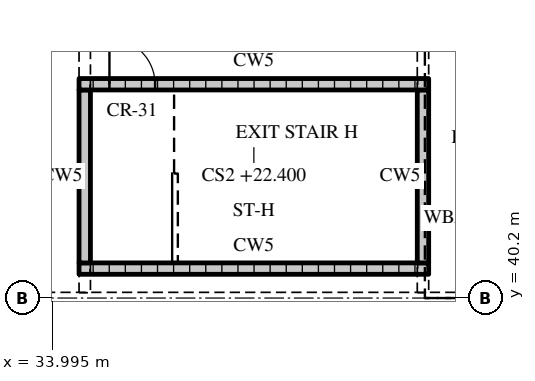
"""IFC4 building model, lengths in metres.
Left out: names, types, materials, properties, quantities, classifications, styles, units other than length and angle.
Written with IfcOpenShell. Run it as: python <this file> out.ifc"""

import sys

from ifc_helpers import new_model, si_unit, direction, frame, frame_2d, origin, place, context, subcontext, project, spatial, rectangle, extrude, element, fill, save


model = new_model("IFC4")
c1 = context("Model", 3, precision=1e-05, world=origin(), true_north=direction((0.0, 1.0)))
c2 = subcontext(c1, "Body", "Model", "MODEL_VIEW")
j1 = project(units=[si_unit("LENGTHUNIT", "METRE"), si_unit("PLANEANGLEUNIT", "RADIAN")], contexts=[c1])
p1 = place(None, origin())
s1 = spatial("IfcSite", under=j1, at=p1, CompositionType="ELEMENT")
p2 = place(p1, origin())
s2 = spatial("IfcBuilding", under=s1, at=p2, CompositionType="ELEMENT")
p3 = place(p2, frame((0.0, 0.0, 19.2)))
s3 = spatial("IfcBuildingStorey", under=s2, at=p3, CompositionType="ELEMENT", Elevation=19.2)
p4 = place(p3, frame((34.7, 40.975, 0.0), z_axis=(0.0, 0.0, 1.0), x_axis=(1.0, 0.0, 0.0)))
e1 = element("IfcWall", 1, at=p4, inside=s3, PredefinedType="SOLIDWALL", context=c2, shape_type="SweptSolid", body=[
    extrude(rectangle(XDim=9.2, YDim=0.3, at=frame_2d((4.6, 0.0))), origin(), (0.0, 0.0, 1.0), 3.0),
])
for number, where, z_axis, x_axis in (
    (2, (34.85, 41.125, 0.0), (0.0, 0.0, 1.0), (0.0, 1.0, 0.0)),
    (3, (43.75, 41.125, 0.0), (0.0, 0.0, 1.0), (0.0, 1.0, 0.0)),
):
    element("IfcWall", number, at=place(p3, frame(where, z_axis=z_axis, x_axis=x_axis)), inside=s3, PredefinedType="SOLIDWALL", context=c2, shape_type="SweptSolid", body=[
        extrude(rectangle(XDim=4.55, YDim=0.3, at=frame_2d((2.275, 0.0))), origin(), (0.0, 0.0, 1.0), 3.0),
    ])
p5 = place(p3, frame((34.7, 45.825, 0.0), z_axis=(0.0, 0.0, 1.0), x_axis=(1.0, 0.0, 0.0)))
e4 = element("IfcWall", 4, at=p5, inside=s3, PredefinedType="SOLIDWALL", context=c2, shape_type="SweptSolid", body=[
    extrude(rectangle(XDim=9.2, YDim=0.3, at=frame_2d((4.6, 0.0))), origin(), (0.0, 0.0, 1.0), 3.0),
])
p6 = place(p5, frame((0.8, 0.0, 0.0)))
e5 = element("IfcOpeningElement", 5, at=p6, cuts=e4, PredefinedType="OPENING", context=c2, shape_type="SweptSolid", body=[
    extrude(rectangle(XDim=1.2, YDim=2.1, at=frame_2d((0.6, 1.05))), frame((0.0, 0.16, 0.0), z_axis=(0.0, -1.0, 0.0), x_axis=(1.0, 0.0, 0.0)), (0.0, 0.0, 1.0), 0.32),
])
p7 = place(p6, origin())
e6 = element("IfcDoor", 6, at=p7, inside=s3, OperationType="SINGLE_SWING_LEFT", PredefinedType="DOOR", context=c2, shape_type="SweptSolid", body=[
    extrude(rectangle(XDim=1.2, YDim=2.1, at=frame_2d((0.6, 1.05))), frame((0.0, 0.025, 0.0), z_axis=(0.0, -1.0, 0.0), x_axis=(1.0, 0.0, 0.0)), (0.0, 0.0, 1.0), 0.05),
])
fill(e5, e6)
save(model, sys.argv[1])
